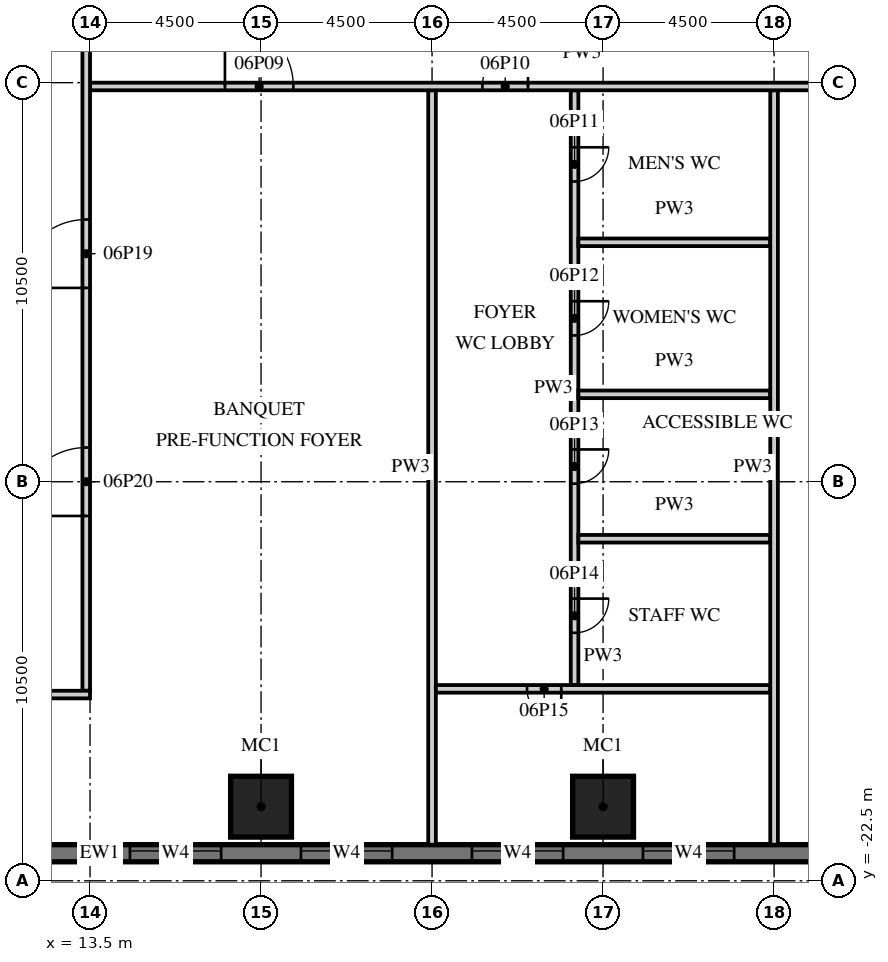
"""IFC4 building model, lengths in metres.
Left out: names, types, materials, properties, quantities, classifications, styles, units other than length and angle.
Written with IfcOpenShell. Run it as: python <this file> out.ifc"""

import sys

from ifc_helpers import new_model, si_unit, direction, frame, frame_2d, origin, origin_2d, place, context, subcontext, project, spatial, rectangle, extrude, element, fill, save


model = new_model("IFC4")
c1 = context("Model", 3, precision=1e-05, world=origin(), true_north=direction((0.0, 1.0)))
c2 = subcontext(c1, "Body", "Model", "MODEL_VIEW")
j1 = project(units=[si_unit("LENGTHUNIT", "METRE"), si_unit("PLANEANGLEUNIT", "RADIAN")], contexts=[c1])
p1 = place(None, origin())
s1 = spatial("IfcSite", under=j1, at=p1, CompositionType="ELEMENT")
p2 = place(p1, origin())
s2 = spatial("IfcBuilding", under=s1, at=p2, CompositionType="ELEMENT")
p3 = place(p2, frame((0.0, 0.0, 38.0)))
s3 = spatial("IfcBuildingStorey", under=s2, at=p3, CompositionType="ELEMENT", Elevation=38.0)
for number, where, z_axis, x_axis in (
    (1, (18.0, -20.55, 0.0), (0.0, 0.0, 1.0), (1.0, 0.0, 0.0)),
    (2, (27.0, -20.55, 0.0), (0.0, 0.0, 1.0), (1.0, 0.0, 0.0)),
):
    element("IfcColumn", number, at=place(p3, frame(where, z_axis=z_axis, x_axis=x_axis)), inside=s3, PredefinedType="COLUMN", context=c2, shape_type="SweptSolid", body=[
        extrude(rectangle(XDim=1.6, YDim=1.6, at=origin_2d()), origin(), (0.0, 0.0, 1.0), 8.7),
    ])
p4 = place(p3, frame((-13.5, -21.775, 0.0), z_axis=(0.0, 0.0, 1.0), x_axis=(1.0, 0.0, 0.0)))
e3 = element("IfcWall", 3, at=p4, inside=s3, PredefinedType="SOLIDWALL", context=c2, shape_type="SweptSolid", body=[
    extrude(rectangle(XDim=54.5, YDim=0.45, at=frame_2d((27.25, 0.0))), origin(), (0.0, 0.0, 1.0), 8.7),
])
p5 = place(p4, frame((1.05, 0.0, 0.9)))
e4 = element("IfcOpeningElement", 4, at=p5, cuts=e3, PredefinedType="OPENING", context=c2, shape_type="SweptSolid", body=[
    extrude(rectangle(XDim=2.4, YDim=1.8, at=frame_2d((1.2, 0.9))), frame((0.0, 0.235, 0.0), z_axis=(0.0, -1.0, 0.0), x_axis=(1.0, 0.0, 0.0)), (0.0, 0.0, 1.0), 0.47),
])
p6 = place(p4, frame((5.55, 0.0, 0.9)))
e5 = element("IfcOpeningElement", 5, at=p6, cuts=e3, PredefinedType="OPENING", context=c2, shape_type="SweptSolid", body=[
    extrude(rectangle(XDim=2.4, YDim=1.8, at=frame_2d((1.2, 0.9))), frame((0.0, 0.235, 0.0), z_axis=(0.0, -1.0, 0.0), x_axis=(1.0, 0.0, 0.0)), (0.0, 0.0, 1.0), 0.47),
])
p7 = place(p4, frame((10.05, 0.0, 0.9)))
e6 = element("IfcOpeningElement", 6, at=p7, cuts=e3, PredefinedType="OPENING", context=c2, shape_type="SweptSolid", body=[
    extrude(rectangle(XDim=2.4, YDim=1.8, at=frame_2d((1.2, 0.9))), frame((0.0, 0.235, 0.0), z_axis=(0.0, -1.0, 0.0), x_axis=(1.0, 0.0, 0.0)), (0.0, 0.0, 1.0), 0.47),
])
p8 = place(p4, frame((14.55, 0.0, 0.9)))
e7 = element("IfcOpeningElement", 7, at=p8, cuts=e3, PredefinedType="OPENING", context=c2, shape_type="SweptSolid", body=[
    extrude(rectangle(XDim=2.4, YDim=1.8, at=frame_2d((1.2, 0.9))), frame((0.0, 0.235, 0.0), z_axis=(0.0, -1.0, 0.0), x_axis=(1.0, 0.0, 0.0)), (0.0, 0.0, 1.0), 0.47),
])
p9 = place(p4, frame((19.05, 0.0, 0.9)))
e8 = element("IfcOpeningElement", 8, at=p9, cuts=e3, PredefinedType="OPENING", context=c2, shape_type="SweptSolid", body=[
    extrude(rectangle(XDim=2.4, YDim=1.8, at=frame_2d((1.2, 0.9))), frame((0.0, 0.235, 0.0), z_axis=(0.0, -1.0, 0.0), x_axis=(1.0, 0.0, 0.0)), (0.0, 0.0, 1.0), 0.47),
])
p10 = place(p4, frame((23.55, 0.0, 0.9)))
e9 = element("IfcOpeningElement", 9, at=p10, cuts=e3, PredefinedType="OPENING", context=c2, shape_type="SweptSolid", body=[
    extrude(rectangle(XDim=2.4, YDim=1.8, at=frame_2d((1.2, 0.9))), frame((0.0, 0.235, 0.0), z_axis=(0.0, -1.0, 0.0), x_axis=(1.0, 0.0, 0.0)), (0.0, 0.0, 1.0), 0.47),
])
p11 = place(p4, frame((28.05, 0.0, 0.9)))
e10 = element("IfcOpeningElement", 10, at=p11, cuts=e3, PredefinedType="OPENING", context=c2, shape_type="SweptSolid", body=[
    extrude(rectangle(XDim=2.4, YDim=1.8, at=frame_2d((1.2, 0.9))), frame((0.0, 0.235, 0.0), z_axis=(0.0, -1.0, 0.0), x_axis=(1.0, 0.0, 0.0)), (0.0, 0.0, 1.0), 0.47),
])
p12 = place(p4, frame((32.55, 0.0, 0.9)))
e11 = element("IfcOpeningElement", 11, at=p12, cuts=e3, PredefinedType="OPENING", context=c2, shape_type="SweptSolid", body=[
    extrude(rectangle(XDim=2.4, YDim=1.8, at=frame_2d((1.2, 0.9))), frame((0.0, 0.235, 0.0), z_axis=(0.0, -1.0, 0.0), x_axis=(1.0, 0.0, 0.0)), (0.0, 0.0, 1.0), 0.47),
])
p13 = place(p4, frame((37.05, 0.0, 0.9)))
e12 = element("IfcOpeningElement", 12, at=p13, cuts=e3, PredefinedType="OPENING", context=c2, shape_type="SweptSolid", body=[
    extrude(rectangle(XDim=2.4, YDim=1.8, at=frame_2d((1.2, 0.9))), frame((0.0, 0.235, 0.0), z_axis=(0.0, -1.0, 0.0), x_axis=(1.0, 0.0, 0.0)), (0.0, 0.0, 1.0), 0.47),
])
p14 = place(p4, frame((41.55, 0.0, 0.9)))
e13 = element("IfcOpeningElement", 13, at=p14, cuts=e3, PredefinedType="OPENING", context=c2, shape_type="SweptSolid", body=[
    extrude(rectangle(XDim=2.4, YDim=1.8, at=frame_2d((1.2, 0.9))), frame((0.0, 0.235, 0.0), z_axis=(0.0, -1.0, 0.0), x_axis=(1.0, 0.0, 0.0)), (0.0, 0.0, 1.0), 0.47),
])
p15 = place(p4, frame((46.05, 0.0, 0.9)))
e14 = element("IfcOpeningElement", 14, at=p15, cuts=e3, PredefinedType="OPENING", context=c2, shape_type="SweptSolid", body=[
    extrude(rectangle(XDim=2.4, YDim=1.8, at=frame_2d((1.2, 0.9))), frame((0.0, 0.235, 0.0), z_axis=(0.0, -1.0, 0.0), x_axis=(1.0, 0.0, 0.0)), (0.0, 0.0, 1.0), 0.47),
])
p16 = place(p3, frame((22.5, -21.55, 0.0), z_axis=(0.0, 0.0, 1.0), x_axis=(0.0, 1.0, 0.0)))
e15 = element("IfcWall", 15, at=p16, inside=s3, PredefinedType="PARTITIONING", context=c2, shape_type="SweptSolid", body=[
    extrude(rectangle(XDim=19.85, YDim=0.2, at=frame_2d((9.925, 0.0))), origin(), (0.0, 0.0, 1.0), 8.7),
])
p17 = place(p3, frame((26.25, -17.35, 0.0), z_axis=(0.0, 0.0, 1.0), x_axis=(0.0, 1.0, 0.0)))
e16 = element("IfcWall", 16, at=p17, inside=s3, PredefinedType="PARTITIONING", context=c2, shape_type="SweptSolid", body=[
    extrude(rectangle(XDim=15.65, YDim=0.2, at=frame_2d((7.825, 0.0))), origin(), (0.0, 0.0, 1.0), 8.7),
])
p18 = place(p17, frame((13.25, 0.0, 0.0)))
e17 = element("IfcOpeningElement", 17, at=p18, cuts=e16, PredefinedType="OPENING", context=c2, shape_type="SweptSolid", body=[
    extrude(rectangle(XDim=0.9, YDim=2.1, at=frame_2d((0.45, 1.05))), frame((0.0, 0.11, 0.0), z_axis=(0.0, -1.0, 0.0), x_axis=(1.0, 0.0, 0.0)), (0.0, 0.0, 1.0), 0.22),
])
p19 = place(p17, frame((9.2, 0.0, 0.0)))
e18 = element("IfcOpeningElement", 18, at=p19, cuts=e16, PredefinedType="OPENING", context=c2, shape_type="SweptSolid", body=[
    extrude(rectangle(XDim=0.9, YDim=2.1, at=frame_2d((0.45, 1.05))), frame((0.0, 0.11, 0.0), z_axis=(0.0, -1.0, 0.0), x_axis=(1.0, 0.0, 0.0)), (0.0, 0.0, 1.0), 0.22),
])
p20 = place(p17, frame((5.3, 0.0, 0.0)))
e19 = element("IfcOpeningElement", 19, at=p20, cuts=e16, PredefinedType="OPENING", context=c2, shape_type="SweptSolid", body=[
    extrude(rectangle(XDim=0.9, YDim=2.1, at=frame_2d((0.45, 1.05))), frame((0.0, 0.11, 0.0), z_axis=(0.0, -1.0, 0.0), x_axis=(1.0, 0.0, 0.0)), (0.0, 0.0, 1.0), 0.22),
])
p21 = place(p17, frame((1.375, 0.0, 0.0)))
e20 = element("IfcOpeningElement", 20, at=p21, cuts=e16, PredefinedType="OPENING", context=c2, shape_type="SweptSolid", body=[
    extrude(rectangle(XDim=0.9, YDim=2.1, at=frame_2d((0.45, 1.05))), frame((0.0, 0.11, 0.0), z_axis=(0.0, -1.0, 0.0), x_axis=(1.0, 0.0, 0.0)), (0.0, 0.0, 1.0), 0.22),
])
for number, where, z_axis, x_axis in (
    (21, (26.35, -5.7, 0.0), (0.0, 0.0, 1.0), (1.0, 0.0, 0.0)),
    (22, (26.35, -9.7, 0.0), (0.0, 0.0, 1.0), (1.0, 0.0, 0.0)),
    (23, (26.35, -13.5, 0.0), (0.0, 0.0, 1.0), (1.0, 0.0, 0.0)),
):
    element("IfcWall", number, at=place(p3, frame(where, z_axis=z_axis, x_axis=x_axis)), inside=s3, PredefinedType="PARTITIONING", context=c2, shape_type="SweptSolid", body=[
        extrude(rectangle(XDim=5.05, YDim=0.2, at=frame_2d((2.525, 0.0))), origin(), (0.0, 0.0, 1.0), 8.7),
    ])
p22 = place(p3, frame((22.6, -17.45, 0.0), z_axis=(0.0, 0.0, 1.0), x_axis=(1.0, 0.0, 0.0)))
e24 = element("IfcWall", 24, at=p22, inside=s3, PredefinedType="PARTITIONING", context=c2, shape_type="SweptSolid", body=[
    extrude(rectangle(XDim=8.8, YDim=0.2, at=frame_2d((4.4, 0.0))), origin(), (0.0, 0.0, 1.0), 8.7),
])
p23 = place(p22, frame((2.4, 0.0, 0.0)))
e25 = element("IfcOpeningElement", 25, at=p23, cuts=e24, PredefinedType="OPENING", context=c2, shape_type="SweptSolid", body=[
    extrude(rectangle(XDim=0.9, YDim=2.1, at=frame_2d((0.45, 1.05))), frame((0.0, 0.11, 0.0), z_axis=(0.0, -1.0, 0.0), x_axis=(1.0, 0.0, 0.0)), (0.0, 0.0, 1.0), 0.22),
])
p24 = place(p3, frame((31.5, -21.55, 0.0), z_axis=(0.0, 0.0, 1.0), x_axis=(0.0, 1.0, 0.0)))
e26 = element("IfcWall", 26, at=p24, inside=s3, PredefinedType="PARTITIONING", context=c2, shape_type="SweptSolid", body=[
    extrude(rectangle(XDim=19.85, YDim=0.2, at=frame_2d((9.925, 0.0))), origin(), (0.0, 0.0, 1.0), 8.7),
])
p25 = place(p3, frame((13.5, -1.6, 0.0), z_axis=(0.0, 0.0, 1.0), x_axis=(1.0, 0.0, 0.0)))
e27 = element("IfcWall", 27, at=p25, inside=s3, PredefinedType="PARTITIONING", context=c2, shape_type="SweptSolid", body=[
    extrude(rectangle(XDim=25.9, YDim=0.2, at=frame_2d((12.95, 0.0))), origin(), (0.0, 0.0, 1.0), 8.7),
])
p26 = place(p25, frame((3.55, 0.0, 0.0)))
e28 = element("IfcOpeningElement", 28, at=p26, cuts=e27, PredefinedType="OPENING", context=c2, shape_type="SweptSolid", body=[
    extrude(rectangle(XDim=1.8, YDim=2.1, at=frame_2d((0.9, 1.05))), frame((0.0, 0.11, 0.0), z_axis=(0.0, -1.0, 0.0), x_axis=(1.0, 0.0, 0.0)), (0.0, 0.0, 1.0), 0.22),
])
p27 = place(p25, frame((10.325, 0.0, 0.0)))
e29 = element("IfcOpeningElement", 29, at=p27, cuts=e27, PredefinedType="OPENING", context=c2, shape_type="SweptSolid", body=[
    extrude(rectangle(XDim=1.2, YDim=2.1, at=frame_2d((0.6, 1.05))), frame((0.0, 0.11, 0.0), z_axis=(0.0, -1.0, 0.0), x_axis=(1.0, 0.0, 0.0)), (0.0, 0.0, 1.0), 0.22),
])
p28 = place(p25, frame((21.4, 0.0, 0.0)))
e30 = element("IfcOpeningElement", 30, at=p28, cuts=e27, PredefinedType="OPENING", context=c2, shape_type="SweptSolid", body=[
    extrude(rectangle(XDim=1.0, YDim=2.1, at=frame_2d((0.5, 1.05))), frame((0.0, 0.11, 0.0), z_axis=(0.0, -1.0, 0.0), x_axis=(1.0, 0.0, 0.0)), (0.0, 0.0, 1.0), 0.22),
])
p29 = place(p3, frame((13.4, -17.5, 0.0), z_axis=(0.0, 0.0, 1.0), x_axis=(0.0, 1.0, 0.0)))
e31 = element("IfcWall", 31, at=p29, inside=s3, PredefinedType="PARTITIONING", context=c2, shape_type="SweptSolid", body=[
    extrude(rectangle(XDim=35.0, YDim=0.2, at=frame_2d((17.5, 0.0))), origin(), (0.0, 0.0, 1.0), 8.7),
])
p30 = place(p29, frame((10.6, 0.0, 0.0)))
e32 = element("IfcOpeningElement", 32, at=p30, cuts=e31, PredefinedType="OPENING", context=c2, shape_type="SweptSolid", body=[
    extrude(rectangle(XDim=1.8, YDim=2.1, at=frame_2d((0.9, 1.05))), frame((0.0, 0.11, 0.0), z_axis=(0.0, -1.0, 0.0), x_axis=(1.0, 0.0, 0.0)), (0.0, 0.0, 1.0), 0.22),
])
p31 = place(p29, frame((4.6, 0.0, 0.0)))
e33 = element("IfcOpeningElement", 33, at=p31, cuts=e31, PredefinedType="OPENING", context=c2, shape_type="SweptSolid", body=[
    extrude(rectangle(XDim=1.8, YDim=2.1, at=frame_2d((0.9, 1.05))), frame((0.0, 0.11, 0.0), z_axis=(0.0, -1.0, 0.0), x_axis=(1.0, 0.0, 0.0)), (0.0, 0.0, 1.0), 0.22),
])
p32 = place(p3, frame((-13.5, -17.6, 0.0), z_axis=(0.0, 0.0, 1.0), x_axis=(1.0, 0.0, 0.0)))
e34 = element("IfcWall", 34, at=p32, inside=s3, PredefinedType="PARTITIONING", context=c2, shape_type="SweptSolid", body=[
    extrude(rectangle(XDim=27.0, YDim=0.2, at=frame_2d((13.5, 0.0))), origin(), (0.0, 0.0, 1.0), 8.7),
])
p33 = place(p32, frame((4.6, 0.0, 0.0)))
e35 = element("IfcOpeningElement", 35, at=p33, cuts=e34, PredefinedType="OPENING", context=c2, shape_type="SweptSolid", body=[
    extrude(rectangle(XDim=1.8, YDim=2.1, at=frame_2d((0.9, 1.05))), frame((0.0, 0.11, 0.0), z_axis=(0.0, -1.0, 0.0), x_axis=(1.0, 0.0, 0.0)), (0.0, 0.0, 1.0), 0.22),
])
p34 = place(p32, frame((12.6, 0.0, 0.0)))
e36 = element("IfcOpeningElement", 36, at=p34, cuts=e34, PredefinedType="OPENING", context=c2, shape_type="SweptSolid", body=[
    extrude(rectangle(XDim=1.8, YDim=2.1, at=frame_2d((0.9, 1.05))), frame((0.0, 0.11, 0.0), z_axis=(0.0, -1.0, 0.0), x_axis=(1.0, 0.0, 0.0)), (0.0, 0.0, 1.0), 0.22),
])
p35 = place(p32, frame((20.6, 0.0, 0.0)))
e37 = element("IfcOpeningElement", 37, at=p35, cuts=e34, PredefinedType="OPENING", context=c2, shape_type="SweptSolid", body=[
    extrude(rectangle(XDim=1.8, YDim=2.1, at=frame_2d((0.9, 1.05))), frame((0.0, 0.11, 0.0), z_axis=(0.0, -1.0, 0.0), x_axis=(1.0, 0.0, 0.0)), (0.0, 0.0, 1.0), 0.22),
])
p36 = place(p11, origin())
e38 = element("IfcWindow", 38, at=p36, inside=s3, PartitioningType="SINGLE_PANEL", PredefinedType="WINDOW", context=c2, shape_type="SweptSolid", body=[
    extrude(rectangle(XDim=2.4, YDim=1.8, at=frame_2d((1.2, 0.9))), frame((0.0, 0.09, 0.0), z_axis=(0.0, -1.0, 0.0), x_axis=(1.0, 0.0, 0.0)), (0.0, 0.0, 1.0), 0.06),
])
fill(e10, e38)
p37 = place(p12, origin())
e39 = element("IfcWindow", 39, at=p37, inside=s3, PartitioningType="SINGLE_PANEL", PredefinedType="WINDOW", context=c2, shape_type="SweptSolid", body=[
    extrude(rectangle(XDim=2.4, YDim=1.8, at=frame_2d((1.2, 0.9))), frame((0.0, 0.09, 0.0), z_axis=(0.0, -1.0, 0.0), x_axis=(1.0, 0.0, 0.0)), (0.0, 0.0, 1.0), 0.06),
])
fill(e11, e39)
p38 = place(p13, origin())
e40 = element("IfcWindow", 40, at=p38, inside=s3, PartitioningType="SINGLE_PANEL", PredefinedType="WINDOW", context=c2, shape_type="SweptSolid", body=[
    extrude(rectangle(XDim=2.4, YDim=1.8, at=frame_2d((1.2, 0.9))), frame((0.0, 0.09, 0.0), z_axis=(0.0, -1.0, 0.0), x_axis=(1.0, 0.0, 0.0)), (0.0, 0.0, 1.0), 0.06),
])
fill(e12, e40)
p39 = place(p14, origin())
e41 = element("IfcWindow", 41, at=p39, inside=s3, PartitioningType="SINGLE_PANEL", PredefinedType="WINDOW", context=c2, shape_type="SweptSolid", body=[
    extrude(rectangle(XDim=2.4, YDim=1.8, at=frame_2d((1.2, 0.9))), frame((0.0, 0.09, 0.0), z_axis=(0.0, -1.0, 0.0), x_axis=(1.0, 0.0, 0.0)), (0.0, 0.0, 1.0), 0.06),
])
fill(e13, e41)
p40 = place(p26, origin())
e42 = element("IfcDoor", 42, at=p40, inside=s3, OperationType="DOUBLE_DOOR_DOUBLE_SWING", PredefinedType="DOOR", context=c2, shape_type="SweptSolid", body=[
    extrude(rectangle(XDim=1.8, YDim=2.1, at=frame_2d((0.9, 1.05))), frame((0.0, 0.025, 0.0), z_axis=(0.0, -1.0, 0.0), x_axis=(1.0, 0.0, 0.0)), (0.0, 0.0, 1.0), 0.05),
])
fill(e28, e42)
p41 = place(p27, origin())
e43 = element("IfcDoor", 43, at=p41, inside=s3, OperationType="SINGLE_SWING_RIGHT", PredefinedType="DOOR", context=c2, shape_type="SweptSolid", body=[
    extrude(rectangle(XDim=1.2, YDim=2.1, at=frame_2d((0.6, 1.05))), frame((0.0, 0.025, 0.0), z_axis=(0.0, -1.0, 0.0), x_axis=(1.0, 0.0, 0.0)), (0.0, 0.0, 1.0), 0.05),
])
fill(e29, e43)
p42 = place(p18, origin())
e44 = element("IfcDoor", 44, at=p42, inside=s3, OperationType="SINGLE_SWING_RIGHT", PredefinedType="DOOR", context=c2, shape_type="SweptSolid", body=[
    extrude(rectangle(XDim=0.9, YDim=2.1, at=frame_2d((0.45, 1.05))), frame((0.0, 0.025, 0.0), z_axis=(0.0, -1.0, 0.0), x_axis=(1.0, 0.0, 0.0)), (0.0, 0.0, 1.0), 0.05),
])
fill(e17, e44)
p43 = place(p19, origin())
e45 = element("IfcDoor", 45, at=p43, inside=s3, OperationType="SINGLE_SWING_RIGHT", PredefinedType="DOOR", context=c2, shape_type="SweptSolid", body=[
    extrude(rectangle(XDim=0.9, YDim=2.1, at=frame_2d((0.45, 1.05))), frame((0.0, 0.025, 0.0), z_axis=(0.0, -1.0, 0.0), x_axis=(1.0, 0.0, 0.0)), (0.0, 0.0, 1.0), 0.05),
])
fill(e18, e45)
p44 = place(p20, origin())
e46 = element("IfcDoor", 46, at=p44, inside=s3, OperationType="SINGLE_SWING_RIGHT", PredefinedType="DOOR", context=c2, shape_type="SweptSolid", body=[
    extrude(rectangle(XDim=0.9, YDim=2.1, at=frame_2d((0.45, 1.05))), frame((0.0, 0.025, 0.0), z_axis=(0.0, -1.0, 0.0), x_axis=(1.0, 0.0, 0.0)), (0.0, 0.0, 1.0), 0.05),
])
fill(e19, e46)
p45 = place(p21, origin())
e47 = element("IfcDoor", 47, at=p45, inside=s3, OperationType="SINGLE_SWING_RIGHT", PredefinedType="DOOR", context=c2, shape_type="SweptSolid", body=[
    extrude(rectangle(XDim=0.9, YDim=2.1, at=frame_2d((0.45, 1.05))), frame((0.0, 0.025, 0.0), z_axis=(0.0, -1.0, 0.0), x_axis=(1.0, 0.0, 0.0)), (0.0, 0.0, 1.0), 0.05),
])
fill(e20, e47)
p46 = place(p23, origin())
e48 = element("IfcDoor", 48, at=p46, inside=s3, OperationType="SINGLE_SWING_RIGHT", PredefinedType="DOOR", context=c2, shape_type="SweptSolid", body=[
    extrude(rectangle(XDim=0.9, YDim=2.1, at=frame_2d((0.45, 1.05))), frame((0.0, 0.025, 0.0), z_axis=(0.0, -1.0, 0.0), x_axis=(1.0, 0.0, 0.0)), (0.0, 0.0, 1.0), 0.05),
])
fill(e25, e48)
p47 = place(p30, origin())
e49 = element("IfcDoor", 49, at=p47, inside=s3, OperationType="DOUBLE_DOOR_DOUBLE_SWING", PredefinedType="DOOR", context=c2, shape_type="SweptSolid", body=[
    extrude(rectangle(XDim=1.8, YDim=2.1, at=frame_2d((0.9, 1.05))), frame((0.0, 0.025, 0.0), z_axis=(0.0, -1.0, 0.0), x_axis=(1.0, 0.0, 0.0)), (0.0, 0.0, 1.0), 0.05),
])
fill(e32, e49)
p48 = place(p31, origin())
e50 = element("IfcDoor", 50, at=p48, inside=s3, OperationType="DOUBLE_DOOR_DOUBLE_SWING", PredefinedType="DOOR", context=c2, shape_type="SweptSolid", body=[
    extrude(rectangle(XDim=1.8, YDim=2.1, at=frame_2d((0.9, 1.05))), frame((0.0, 0.025, 0.0), z_axis=(0.0, -1.0, 0.0), x_axis=(1.0, 0.0, 0.0)), (0.0, 0.0, 1.0), 0.05),
])
fill(e33, e50)
save(model, sys.argv[1])
